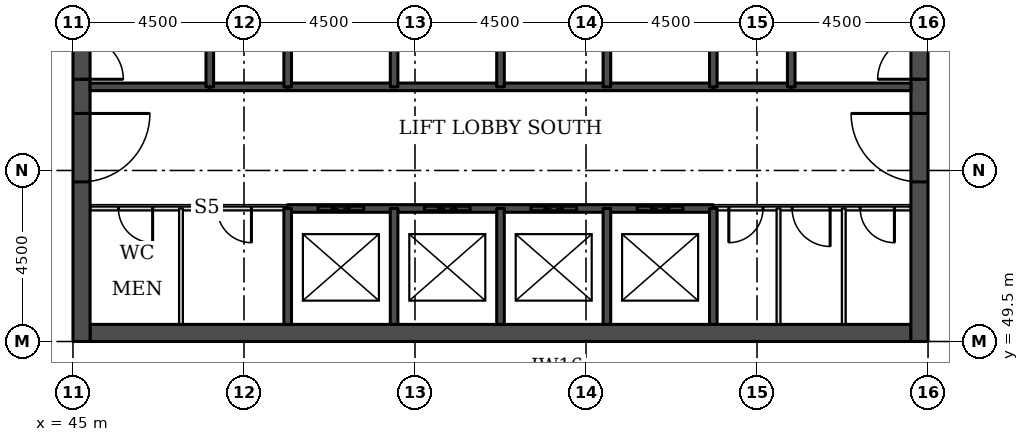
"""IFC4 building model, lengths in metres.
Left out: names, types, materials, properties, quantities, classifications, styles, units other than length and angle.
Written with IfcOpenShell. Run it as: python <this file> out.ifc"""

import sys

from ifc_helpers import new_model, si_unit, direction, frame, frame_2d, origin, place, context, subcontext, project, spatial, rectangle, extrude, element, fill, save


model = new_model("IFC4")
c1 = context("Model", 3, precision=1e-05, world=origin(), true_north=direction((0.0, 1.0)))
c2 = subcontext(c1, "Body", "Model", "MODEL_VIEW")
j1 = project(units=[si_unit("LENGTHUNIT", "METRE"), si_unit("PLANEANGLEUNIT", "RADIAN")], contexts=[c1])
p1 = place(None, origin())
s1 = spatial("IfcSite", under=j1, at=p1, CompositionType="ELEMENT")
p2 = place(p1, origin())
s2 = spatial("IfcBuilding", under=s1, at=p2, CompositionType="ELEMENT")
p3 = place(p2, frame((0.0, 0.0, 86.3)))
s3 = spatial("IfcBuildingStorey", under=s2, at=p3, CompositionType="ELEMENT", Elevation=86.3)
p4 = place(p3, frame((45.45, 49.725, 0.0), z_axis=(0.0, 0.0, 1.0), x_axis=(1.0, 0.0, 0.0)))
e1 = element("IfcWall", 1, at=p4, inside=s3, PredefinedType="SHEAR", context=c2, shape_type="SweptSolid", body=[
    extrude(rectangle(XDim=21.6, YDim=0.45, at=frame_2d((10.8, 0.0))), origin(), (0.0, 0.0, 1.0), 3.7),
])
p5 = place(p3, frame((45.225, 49.5, 0.0), z_axis=(0.0, 0.0, 1.0), x_axis=(0.0, 1.0, 0.0)))
e2 = element("IfcWall", 2, at=p5, inside=s3, PredefinedType="SHEAR", context=c2, shape_type="SweptSolid", body=[
    extrude(rectangle(XDim=22.5, YDim=0.45, at=frame_2d((11.25, 0.0))), origin(), (0.0, 0.0, 1.0), 3.7),
])
p6 = place(p5, frame((4.2, 0.0, 0.0)))
e3 = element("IfcOpeningElement", 3, at=p6, cuts=e2, PredefinedType="OPENING", context=c2, shape_type="SweptSolid", body=[
    extrude(rectangle(XDim=1.8, YDim=2.1, at=frame_2d((0.9, 1.05))), frame((0.0, 0.235, 0.0), z_axis=(0.0, -1.0, 0.0), x_axis=(1.0, 0.0, 0.0)), (0.0, 0.0, 1.0), 0.47),
])
p7 = place(p5, frame((6.9, 0.0, 0.0)))
e4 = element("IfcOpeningElement", 4, at=p7, cuts=e2, PredefinedType="OPENING", context=c2, shape_type="SweptSolid", body=[
    extrude(rectangle(XDim=1.1, YDim=2.1, at=frame_2d((0.55, 1.05))), frame((0.0, 0.235, 0.0), z_axis=(0.0, -1.0, 0.0), x_axis=(1.0, 0.0, 0.0)), (0.0, 0.0, 1.0), 0.47),
])
p8 = place(p5, frame((13.6, 0.0, 0.0)))
e5 = element("IfcOpeningElement", 5, at=p8, cuts=e2, PredefinedType="OPENING", context=c2, shape_type="SweptSolid", body=[
    extrude(rectangle(XDim=1.1, YDim=2.1, at=frame_2d((0.55, 1.05))), frame((0.0, 0.235, 0.0), z_axis=(0.0, -1.0, 0.0), x_axis=(1.0, 0.0, 0.0)), (0.0, 0.0, 1.0), 0.47),
])
p9 = place(p5, frame((16.5, 0.0, 0.0)))
e6 = element("IfcOpeningElement", 6, at=p9, cuts=e2, PredefinedType="OPENING", context=c2, shape_type="SweptSolid", body=[
    extrude(rectangle(XDim=1.8, YDim=2.1, at=frame_2d((0.9, 1.05))), frame((0.0, 0.235, 0.0), z_axis=(0.0, -1.0, 0.0), x_axis=(1.0, 0.0, 0.0)), (0.0, 0.0, 1.0), 0.47),
])
p10 = place(p3, frame((67.275, 49.5, 0.0), z_axis=(0.0, 0.0, 1.0), x_axis=(0.0, 1.0, 0.0)))
e7 = element("IfcWall", 7, at=p10, inside=s3, PredefinedType="SHEAR", context=c2, shape_type="SweptSolid", body=[
    extrude(rectangle(XDim=22.5, YDim=0.45, at=frame_2d((11.25, 0.0))), origin(), (0.0, 0.0, 1.0), 3.7),
])
p11 = place(p10, frame((4.2, 0.0, 0.0)))
e8 = element("IfcOpeningElement", 8, at=p11, cuts=e7, PredefinedType="OPENING", context=c2, shape_type="SweptSolid", body=[
    extrude(rectangle(XDim=1.8, YDim=2.1, at=frame_2d((0.9, 1.05))), frame((0.0, 0.235, 0.0), z_axis=(0.0, -1.0, 0.0), x_axis=(1.0, 0.0, 0.0)), (0.0, 0.0, 1.0), 0.47),
])
p12 = place(p10, frame((6.9, 0.0, 0.0)))
e9 = element("IfcOpeningElement", 9, at=p12, cuts=e7, PredefinedType="OPENING", context=c2, shape_type="SweptSolid", body=[
    extrude(rectangle(XDim=1.1, YDim=2.1, at=frame_2d((0.55, 1.05))), frame((0.0, 0.235, 0.0), z_axis=(0.0, -1.0, 0.0), x_axis=(1.0, 0.0, 0.0)), (0.0, 0.0, 1.0), 0.47),
])
p13 = place(p10, frame((13.6, 0.0, 0.0)))
e10 = element("IfcOpeningElement", 10, at=p13, cuts=e7, PredefinedType="OPENING", context=c2, shape_type="SweptSolid", body=[
    extrude(rectangle(XDim=1.1, YDim=2.1, at=frame_2d((0.55, 1.05))), frame((0.0, 0.235, 0.0), z_axis=(0.0, -1.0, 0.0), x_axis=(1.0, 0.0, 0.0)), (0.0, 0.0, 1.0), 0.47),
])
p14 = place(p10, frame((16.5, 0.0, 0.0)))
e11 = element("IfcOpeningElement", 11, at=p14, cuts=e7, PredefinedType="OPENING", context=c2, shape_type="SweptSolid", body=[
    extrude(rectangle(XDim=1.8, YDim=2.1, at=frame_2d((0.9, 1.05))), frame((0.0, 0.235, 0.0), z_axis=(0.0, -1.0, 0.0), x_axis=(1.0, 0.0, 0.0)), (0.0, 0.0, 1.0), 0.47),
])
p15 = place(p3, frame((45.45, 53.0, 0.0), z_axis=(0.0, 0.0, 1.0), x_axis=(1.0, 0.0, 0.0)))
e12 = element("IfcWall", 12, at=p15, inside=s3, PredefinedType="PARTITIONING", context=c2, shape_type="SweptSolid", body=[
    extrude(rectangle(XDim=5.2, YDim=0.1, at=frame_2d((2.6, 0.0))), origin(), (0.0, 0.0, 1.0), 3.55),
])
p16 = place(p15, frame((0.746, 0.0, 0.0)))
e13 = element("IfcOpeningElement", 13, at=p16, cuts=e12, PredefinedType="OPENING", context=c2, shape_type="SweptSolid", body=[
    extrude(rectangle(XDim=0.9, YDim=2.1, at=frame_2d((0.45, 1.05))), frame((0.0, 0.06, 0.0), z_axis=(0.0, -1.0, 0.0), x_axis=(1.0, 0.0, 0.0)), (0.0, 0.0, 1.0), 0.12),
])
p17 = place(p15, frame((3.346, 0.0, 0.0)))
e14 = element("IfcOpeningElement", 14, at=p17, cuts=e12, PredefinedType="OPENING", context=c2, shape_type="SweptSolid", body=[
    extrude(rectangle(XDim=0.9, YDim=2.1, at=frame_2d((0.45, 1.05))), frame((0.0, 0.06, 0.0), z_axis=(0.0, -1.0, 0.0), x_axis=(1.0, 0.0, 0.0)), (0.0, 0.0, 1.0), 0.12),
])
p18 = place(p3, frame((61.85, 53.0, 0.0), z_axis=(0.0, 0.0, 1.0), x_axis=(1.0, 0.0, 0.0)))
e15 = element("IfcWall", 15, at=p18, inside=s3, PredefinedType="PARTITIONING", context=c2, shape_type="SweptSolid", body=[
    extrude(rectangle(XDim=5.2, YDim=0.1, at=frame_2d((2.6, 0.0))), origin(), (0.0, 0.0, 1.0), 3.55),
])
p19 = place(p18, frame((3.866, 0.0, 0.0)))
e16 = element("IfcOpeningElement", 16, at=p19, cuts=e15, PredefinedType="OPENING", context=c2, shape_type="SweptSolid", body=[
    extrude(rectangle(XDim=0.9, YDim=2.1, at=frame_2d((0.45, 1.05))), frame((0.0, 0.06, 0.0), z_axis=(0.0, -1.0, 0.0), x_axis=(1.0, 0.0, 0.0)), (0.0, 0.0, 1.0), 0.12),
])
p20 = place(p18, frame((2.074, 0.0, 0.0)))
e17 = element("IfcOpeningElement", 17, at=p20, cuts=e15, PredefinedType="OPENING", context=c2, shape_type="SweptSolid", body=[
    extrude(rectangle(XDim=1.0, YDim=2.1, at=frame_2d((0.5, 1.05))), frame((0.0, 0.06, 0.0), z_axis=(0.0, -1.0, 0.0), x_axis=(1.0, 0.0, 0.0)), (0.0, 0.0, 1.0), 0.12),
])
p21 = place(p18, frame((0.408, 0.0, 0.0)))
e18 = element("IfcOpeningElement", 18, at=p21, cuts=e15, PredefinedType="OPENING", context=c2, shape_type="SweptSolid", body=[
    extrude(rectangle(XDim=0.9, YDim=2.1, at=frame_2d((0.45, 1.05))), frame((0.0, 0.06, 0.0), z_axis=(0.0, -1.0, 0.0), x_axis=(1.0, 0.0, 0.0)), (0.0, 0.0, 1.0), 0.12),
])
p22 = place(p3, frame((50.65, 53.0, 0.0), z_axis=(0.0, 0.0, 1.0), x_axis=(1.0, 0.0, 0.0)))
e19 = element("IfcWall", 19, at=p22, inside=s3, PredefinedType="SOLIDWALL", context=c2, shape_type="SweptSolid", body=[
    extrude(rectangle(XDim=11.2, YDim=0.2, at=frame_2d((5.6, 0.0))), origin(), (0.0, 0.0, 1.0), 3.55),
])
p23 = place(p22, frame((0.8, 0.0, 0.0)))
e20 = element("IfcOpeningElement", 20, at=p23, cuts=e19, PredefinedType="OPENING", context=c2, shape_type="SweptSolid", body=[
    extrude(rectangle(XDim=1.2, YDim=2.1, at=frame_2d((0.6, 1.05))), frame((0.0, 0.11, 0.0), z_axis=(0.0, -1.0, 0.0), x_axis=(1.0, 0.0, 0.0)), (0.0, 0.0, 1.0), 0.22),
])
p24 = place(p22, frame((3.6, 0.0, 0.0)))
e21 = element("IfcOpeningElement", 21, at=p24, cuts=e19, PredefinedType="OPENING", context=c2, shape_type="SweptSolid", body=[
    extrude(rectangle(XDim=1.2, YDim=2.1, at=frame_2d((0.6, 1.05))), frame((0.0, 0.11, 0.0), z_axis=(0.0, -1.0, 0.0), x_axis=(1.0, 0.0, 0.0)), (0.0, 0.0, 1.0), 0.22),
])
p25 = place(p22, frame((6.4, 0.0, 0.0)))
e22 = element("IfcOpeningElement", 22, at=p25, cuts=e19, PredefinedType="OPENING", context=c2, shape_type="SweptSolid", body=[
    extrude(rectangle(XDim=1.2, YDim=2.1, at=frame_2d((0.6, 1.05))), frame((0.0, 0.11, 0.0), z_axis=(0.0, -1.0, 0.0), x_axis=(1.0, 0.0, 0.0)), (0.0, 0.0, 1.0), 0.22),
])
p26 = place(p22, frame((9.2, 0.0, 0.0)))
e23 = element("IfcOpeningElement", 23, at=p26, cuts=e19, PredefinedType="OPENING", context=c2, shape_type="SweptSolid", body=[
    extrude(rectangle(XDim=1.2, YDim=2.1, at=frame_2d((0.6, 1.05))), frame((0.0, 0.11, 0.0), z_axis=(0.0, -1.0, 0.0), x_axis=(1.0, 0.0, 0.0)), (0.0, 0.0, 1.0), 0.22),
])
for number, where, z_axis, x_axis in (
    (24, (48.6, 56.2, 0.0), (0.0, 0.0, 1.0), (1.0, 0.0, 0.0)),
    (25, (61.85, 56.2, 0.0), (0.0, 0.0, 1.0), (1.0, 0.0, 0.0)),
):
    element("IfcWall", number, at=place(p3, frame(where, z_axis=z_axis, x_axis=x_axis)), inside=s3, PredefinedType="SOLIDWALL", context=c2, shape_type="SweptSolid", body=[
        extrude(rectangle(XDim=2.05, YDim=0.2, at=frame_2d((1.025, 0.0))), origin(), (0.0, 0.0, 1.0), 3.55),
    ])
p27 = place(p3, frame((45.45, 56.2, 0.0), z_axis=(0.0, 0.0, 1.0), x_axis=(1.0, 0.0, 0.0)))
e26 = element("IfcWall", 26, at=p27, inside=s3, PredefinedType="SOLIDWALL", context=c2, shape_type="SweptSolid", body=[
    extrude(rectangle(XDim=3.15, YDim=0.2, at=frame_2d((1.575, 0.0))), origin(), (0.0, 0.0, 1.0), 3.55),
])
p28 = place(p3, frame((50.65, 56.2, 0.0), z_axis=(0.0, 0.0, 1.0), x_axis=(1.0, 0.0, 0.0)))
e27 = element("IfcWall", 27, at=p28, inside=s3, PredefinedType="SOLIDWALL", context=c2, shape_type="SweptSolid", body=[
    extrude(rectangle(XDim=11.2, YDim=0.2, at=frame_2d((5.6, 0.0))), origin(), (0.0, 0.0, 1.0), 3.55),
])
p29 = place(p3, frame((63.9, 56.2, 0.0), z_axis=(0.0, 0.0, 1.0), x_axis=(1.0, 0.0, 0.0)))
e28 = element("IfcWall", 28, at=p29, inside=s3, PredefinedType="SOLIDWALL", context=c2, shape_type="SweptSolid", body=[
    extrude(rectangle(XDim=3.15, YDim=0.2, at=frame_2d((1.575, 0.0))), origin(), (0.0, 0.0, 1.0), 3.55),
])
p30 = place(p3, frame((47.842, 49.95, 0.0), z_axis=(0.0, 0.0, 1.0), x_axis=(0.0, 1.0, 0.0)))
e29 = element("IfcWall", 29, at=p30, inside=s3, PredefinedType="PARTITIONING", context=c2, shape_type="SweptSolid", body=[
    extrude(rectangle(XDim=3.05, YDim=0.1, at=frame_2d((1.525, 0.0))), origin(), (0.0, 0.0, 1.0), 3.55),
])
p31 = place(p3, frame((48.6, 56.2, 0.0), z_axis=(0.0, 0.0, 1.0), x_axis=(0.0, 1.0, 0.0)))
e30 = element("IfcWall", 30, at=p31, inside=s3, PredefinedType="SOLIDWALL", context=c2, shape_type="SweptSolid", body=[
    extrude(rectangle(XDim=5.8, YDim=0.2, at=frame_2d((2.9, 0.0))), origin(), (0.0, 0.0, 1.0), 3.55),
])
p32 = place(p3, frame((50.65, 49.95, 0.0), z_axis=(0.0, 0.0, 1.0), x_axis=(0.0, 1.0, 0.0)))
e31 = element("IfcWall", 31, at=p32, inside=s3, PredefinedType="SOLIDWALL", context=c2, shape_type="SweptSolid", body=[
    extrude(rectangle(XDim=3.05, YDim=0.2, at=frame_2d((1.525, 0.0))), origin(), (0.0, 0.0, 1.0), 3.55),
])
p33 = place(p3, frame((50.65, 56.2, 0.0), z_axis=(0.0, 0.0, 1.0), x_axis=(0.0, 1.0, 0.0)))
e32 = element("IfcWall", 32, at=p33, inside=s3, PredefinedType="SOLIDWALL", context=c2, shape_type="SweptSolid", body=[
    extrude(rectangle(XDim=2.8, YDim=0.2, at=frame_2d((1.4, 0.0))), origin(), (0.0, 0.0, 1.0), 3.55),
])
p34 = place(p3, frame((53.45, 49.95, 0.0), z_axis=(0.0, 0.0, 1.0), x_axis=(0.0, 1.0, 0.0)))
e33 = element("IfcWall", 33, at=p34, inside=s3, PredefinedType="SOLIDWALL", context=c2, shape_type="SweptSolid", body=[
    extrude(rectangle(XDim=3.05, YDim=0.2, at=frame_2d((1.525, 0.0))), origin(), (0.0, 0.0, 1.0), 3.55),
])
p35 = place(p3, frame((53.45, 56.2, 0.0), z_axis=(0.0, 0.0, 1.0), x_axis=(0.0, 1.0, 0.0)))
e34 = element("IfcWall", 34, at=p35, inside=s3, PredefinedType="SOLIDWALL", context=c2, shape_type="SweptSolid", body=[
    extrude(rectangle(XDim=2.8, YDim=0.2, at=frame_2d((1.4, 0.0))), origin(), (0.0, 0.0, 1.0), 3.55),
])
p36 = place(p3, frame((56.25, 49.95, 0.0), z_axis=(0.0, 0.0, 1.0), x_axis=(0.0, 1.0, 0.0)))
e35 = element("IfcWall", 35, at=p36, inside=s3, PredefinedType="SOLIDWALL", context=c2, shape_type="SweptSolid", body=[
    extrude(rectangle(XDim=3.05, YDim=0.2, at=frame_2d((1.525, 0.0))), origin(), (0.0, 0.0, 1.0), 3.55),
])
p37 = place(p3, frame((56.25, 56.2, 0.0), z_axis=(0.0, 0.0, 1.0), x_axis=(0.0, 1.0, 0.0)))
e36 = element("IfcWall", 36, at=p37, inside=s3, PredefinedType="SOLIDWALL", context=c2, shape_type="SweptSolid", body=[
    extrude(rectangle(XDim=2.8, YDim=0.2, at=frame_2d((1.4, 0.0))), origin(), (0.0, 0.0, 1.0), 3.55),
])
p38 = place(p3, frame((59.05, 49.95, 0.0), z_axis=(0.0, 0.0, 1.0), x_axis=(0.0, 1.0, 0.0)))
e37 = element("IfcWall", 37, at=p38, inside=s3, PredefinedType="SOLIDWALL", context=c2, shape_type="SweptSolid", body=[
    extrude(rectangle(XDim=3.05, YDim=0.2, at=frame_2d((1.525, 0.0))), origin(), (0.0, 0.0, 1.0), 3.55),
])
p39 = place(p3, frame((59.05, 56.2, 0.0), z_axis=(0.0, 0.0, 1.0), x_axis=(0.0, 1.0, 0.0)))
e38 = element("IfcWall", 38, at=p39, inside=s3, PredefinedType="SOLIDWALL", context=c2, shape_type="SweptSolid", body=[
    extrude(rectangle(XDim=2.8, YDim=0.2, at=frame_2d((1.4, 0.0))), origin(), (0.0, 0.0, 1.0), 3.55),
])
p40 = place(p3, frame((61.85, 49.95, 0.0), z_axis=(0.0, 0.0, 1.0), x_axis=(0.0, 1.0, 0.0)))
e39 = element("IfcWall", 39, at=p40, inside=s3, PredefinedType="SOLIDWALL", context=c2, shape_type="SweptSolid", body=[
    extrude(rectangle(XDim=3.05, YDim=0.2, at=frame_2d((1.525, 0.0))), origin(), (0.0, 0.0, 1.0), 3.55),
])
p41 = place(p3, frame((61.85, 56.2, 0.0), z_axis=(0.0, 0.0, 1.0), x_axis=(0.0, 1.0, 0.0)))
e40 = element("IfcWall", 40, at=p41, inside=s3, PredefinedType="SOLIDWALL", context=c2, shape_type="SweptSolid", body=[
    extrude(rectangle(XDim=2.8, YDim=0.2, at=frame_2d((1.4, 0.0))), origin(), (0.0, 0.0, 1.0), 3.55),
])
p42 = place(p3, frame((63.566, 49.95, 0.0), z_axis=(0.0, 0.0, 1.0), x_axis=(0.0, 1.0, 0.0)))
e41 = element("IfcWall", 41, at=p42, inside=s3, PredefinedType="PARTITIONING", context=c2, shape_type="SweptSolid", body=[
    extrude(rectangle(XDim=3.05, YDim=0.1, at=frame_2d((1.525, 0.0))), origin(), (0.0, 0.0, 1.0), 3.55),
])
p43 = place(p3, frame((63.9, 56.2, 0.0), z_axis=(0.0, 0.0, 1.0), x_axis=(0.0, 1.0, 0.0)))
e42 = element("IfcWall", 42, at=p43, inside=s3, PredefinedType="SOLIDWALL", context=c2, shape_type="SweptSolid", body=[
    extrude(rectangle(XDim=5.8, YDim=0.2, at=frame_2d((2.9, 0.0))), origin(), (0.0, 0.0, 1.0), 3.55),
])
p44 = place(p3, frame((65.282, 49.95, 0.0), z_axis=(0.0, 0.0, 1.0), x_axis=(0.0, 1.0, 0.0)))
e43 = element("IfcWall", 43, at=p44, inside=s3, PredefinedType="PARTITIONING", context=c2, shape_type="SweptSolid", body=[
    extrude(rectangle(XDim=3.05, YDim=0.1, at=frame_2d((1.525, 0.0))), origin(), (0.0, 0.0, 1.0), 3.55),
])
p45 = place(p23, origin())
e44 = element("IfcDoor", 44, at=p45, inside=s3, OperationType="DOUBLE_DOOR_SLIDING", PredefinedType="DOOR", context=c2, shape_type="SweptSolid", body=[
    extrude(rectangle(XDim=1.2, YDim=2.1, at=frame_2d((0.6, 1.05))), frame((0.0, 0.025, 0.0), z_axis=(0.0, -1.0, 0.0), x_axis=(1.0, 0.0, 0.0)), (0.0, 0.0, 1.0), 0.05),
])
fill(e20, e44)
p46 = place(p24, origin())
e45 = element("IfcDoor", 45, at=p46, inside=s3, OperationType="DOUBLE_DOOR_SLIDING", PredefinedType="DOOR", context=c2, shape_type="SweptSolid", body=[
    extrude(rectangle(XDim=1.2, YDim=2.1, at=frame_2d((0.6, 1.05))), frame((0.0, 0.025, 0.0), z_axis=(0.0, -1.0, 0.0), x_axis=(1.0, 0.0, 0.0)), (0.0, 0.0, 1.0), 0.05),
])
fill(e21, e45)
p47 = place(p25, origin())
e46 = element("IfcDoor", 46, at=p47, inside=s3, OperationType="DOUBLE_DOOR_SLIDING", PredefinedType="DOOR", context=c2, shape_type="SweptSolid", body=[
    extrude(rectangle(XDim=1.2, YDim=2.1, at=frame_2d((0.6, 1.05))), frame((0.0, 0.025, 0.0), z_axis=(0.0, -1.0, 0.0), x_axis=(1.0, 0.0, 0.0)), (0.0, 0.0, 1.0), 0.05),
])
fill(e22, e46)
p48 = place(p26, origin())
e47 = element("IfcDoor", 47, at=p48, inside=s3, OperationType="DOUBLE_DOOR_SLIDING", PredefinedType="DOOR", context=c2, shape_type="SweptSolid", body=[
    extrude(rectangle(XDim=1.2, YDim=2.1, at=frame_2d((0.6, 1.05))), frame((0.0, 0.025, 0.0), z_axis=(0.0, -1.0, 0.0), x_axis=(1.0, 0.0, 0.0)), (0.0, 0.0, 1.0), 0.05),
])
fill(e23, e47)
p49 = place(p6, frame((1.8, 0.0, 0.0), z_axis=(0.0, 0.0, 1.0), x_axis=(-1.0, 0.0, 0.0)))
e48 = element("IfcDoor", 48, at=p49, inside=s3, OperationType="SINGLE_SWING_LEFT", PredefinedType="DOOR", context=c2, shape_type="SweptSolid", body=[
    extrude(rectangle(XDim=1.8, YDim=2.1, at=frame_2d((0.9, 1.05))), frame((0.0, 0.025, 0.0), z_axis=(0.0, -1.0, 0.0), x_axis=(1.0, 0.0, 0.0)), (0.0, 0.0, 1.0), 0.05),
])
fill(e3, e48)
p50 = place(p7, frame((1.1, 0.0, 0.0), z_axis=(0.0, 0.0, 1.0), x_axis=(-1.0, 0.0, 0.0)))
e49 = element("IfcDoor", 49, at=p50, inside=s3, OperationType="SINGLE_SWING_RIGHT", PredefinedType="DOOR", context=c2, shape_type="SweptSolid", body=[
    extrude(rectangle(XDim=1.1, YDim=2.1, at=frame_2d((0.55, 1.05))), frame((0.0, 0.025, 0.0), z_axis=(0.0, -1.0, 0.0), x_axis=(1.0, 0.0, 0.0)), (0.0, 0.0, 1.0), 0.05),
])
fill(e4, e49)
p51 = place(p11, origin())
e50 = element("IfcDoor", 50, at=p51, inside=s3, OperationType="SINGLE_SWING_RIGHT", PredefinedType="DOOR", context=c2, shape_type="SweptSolid", body=[
    extrude(rectangle(XDim=1.8, YDim=2.1, at=frame_2d((0.9, 1.05))), frame((0.0, 0.025, 0.0), z_axis=(0.0, -1.0, 0.0), x_axis=(1.0, 0.0, 0.0)), (0.0, 0.0, 1.0), 0.05),
])
fill(e8, e50)
p52 = place(p12, origin())
e51 = element("IfcDoor", 51, at=p52, inside=s3, OperationType="SINGLE_SWING_LEFT", PredefinedType="DOOR", context=c2, shape_type="SweptSolid", body=[
    extrude(rectangle(XDim=1.1, YDim=2.1, at=frame_2d((0.55, 1.05))), frame((0.0, 0.025, 0.0), z_axis=(0.0, -1.0, 0.0), x_axis=(1.0, 0.0, 0.0)), (0.0, 0.0, 1.0), 0.05),
])
fill(e9, e51)
p53 = place(p19, frame((0.9, 0.0, 0.0), z_axis=(0.0, 0.0, 1.0), x_axis=(-1.0, 0.0, 0.0)))
e52 = element("IfcDoor", 52, at=p53, inside=s3, OperationType="SINGLE_SWING_LEFT", PredefinedType="DOOR", context=c2, shape_type="SweptSolid", body=[
    extrude(rectangle(XDim=0.9, YDim=2.1, at=frame_2d((0.45, 1.05))), frame((0.0, 0.025, 0.0), z_axis=(0.0, -1.0, 0.0), x_axis=(1.0, 0.0, 0.0)), (0.0, 0.0, 1.0), 0.05),
])
fill(e16, e52)
p54 = place(p20, frame((1.0, 0.0, 0.0), z_axis=(0.0, 0.0, 1.0), x_axis=(-1.0, 0.0, 0.0)))
e53 = element("IfcDoor", 53, at=p54, inside=s3, OperationType="SINGLE_SWING_LEFT", PredefinedType="DOOR", context=c2, shape_type="SweptSolid", body=[
    extrude(rectangle(XDim=1.0, YDim=2.1, at=frame_2d((0.5, 1.05))), frame((0.0, 0.025, 0.0), z_axis=(0.0, -1.0, 0.0), x_axis=(1.0, 0.0, 0.0)), (0.0, 0.0, 1.0), 0.05),
])
fill(e17, e53)
p55 = place(p21, frame((0.9, 0.0, 0.0), z_axis=(0.0, 0.0, 1.0), x_axis=(-1.0, 0.0, 0.0)))
e54 = element("IfcDoor", 54, at=p55, inside=s3, OperationType="SINGLE_SWING_RIGHT", PredefinedType="DOOR", context=c2, shape_type="SweptSolid", body=[
    extrude(rectangle(XDim=0.9, YDim=2.1, at=frame_2d((0.45, 1.05))), frame((0.0, 0.025, 0.0), z_axis=(0.0, -1.0, 0.0), x_axis=(1.0, 0.0, 0.0)), (0.0, 0.0, 1.0), 0.05),
])
fill(e18, e54)
p56 = place(p16, frame((0.9, 0.0, 0.0), z_axis=(0.0, 0.0, 1.0), x_axis=(-1.0, 0.0, 0.0)))
e55 = element("IfcDoor", 55, at=p56, inside=s3, OperationType="SINGLE_SWING_LEFT", PredefinedType="DOOR", context=c2, shape_type="SweptSolid", body=[
    extrude(rectangle(XDim=0.9, YDim=2.1, at=frame_2d((0.45, 1.05))), frame((0.0, 0.025, 0.0), z_axis=(0.0, -1.0, 0.0), x_axis=(1.0, 0.0, 0.0)), (0.0, 0.0, 1.0), 0.05),
])
fill(e13, e55)
p57 = place(p17, frame((0.9, 0.0, 0.0), z_axis=(0.0, 0.0, 1.0), x_axis=(-1.0, 0.0, 0.0)))
e56 = element("IfcDoor", 56, at=p57, inside=s3, OperationType="SINGLE_SWING_LEFT", PredefinedType="DOOR", context=c2, shape_type="SweptSolid", body=[
    extrude(rectangle(XDim=0.9, YDim=2.1, at=frame_2d((0.45, 1.05))), frame((0.0, 0.025, 0.0), z_axis=(0.0, -1.0, 0.0), x_axis=(1.0, 0.0, 0.0)), (0.0, 0.0, 1.0), 0.05),
])
fill(e14, e56)
save(model, sys.argv[1])
